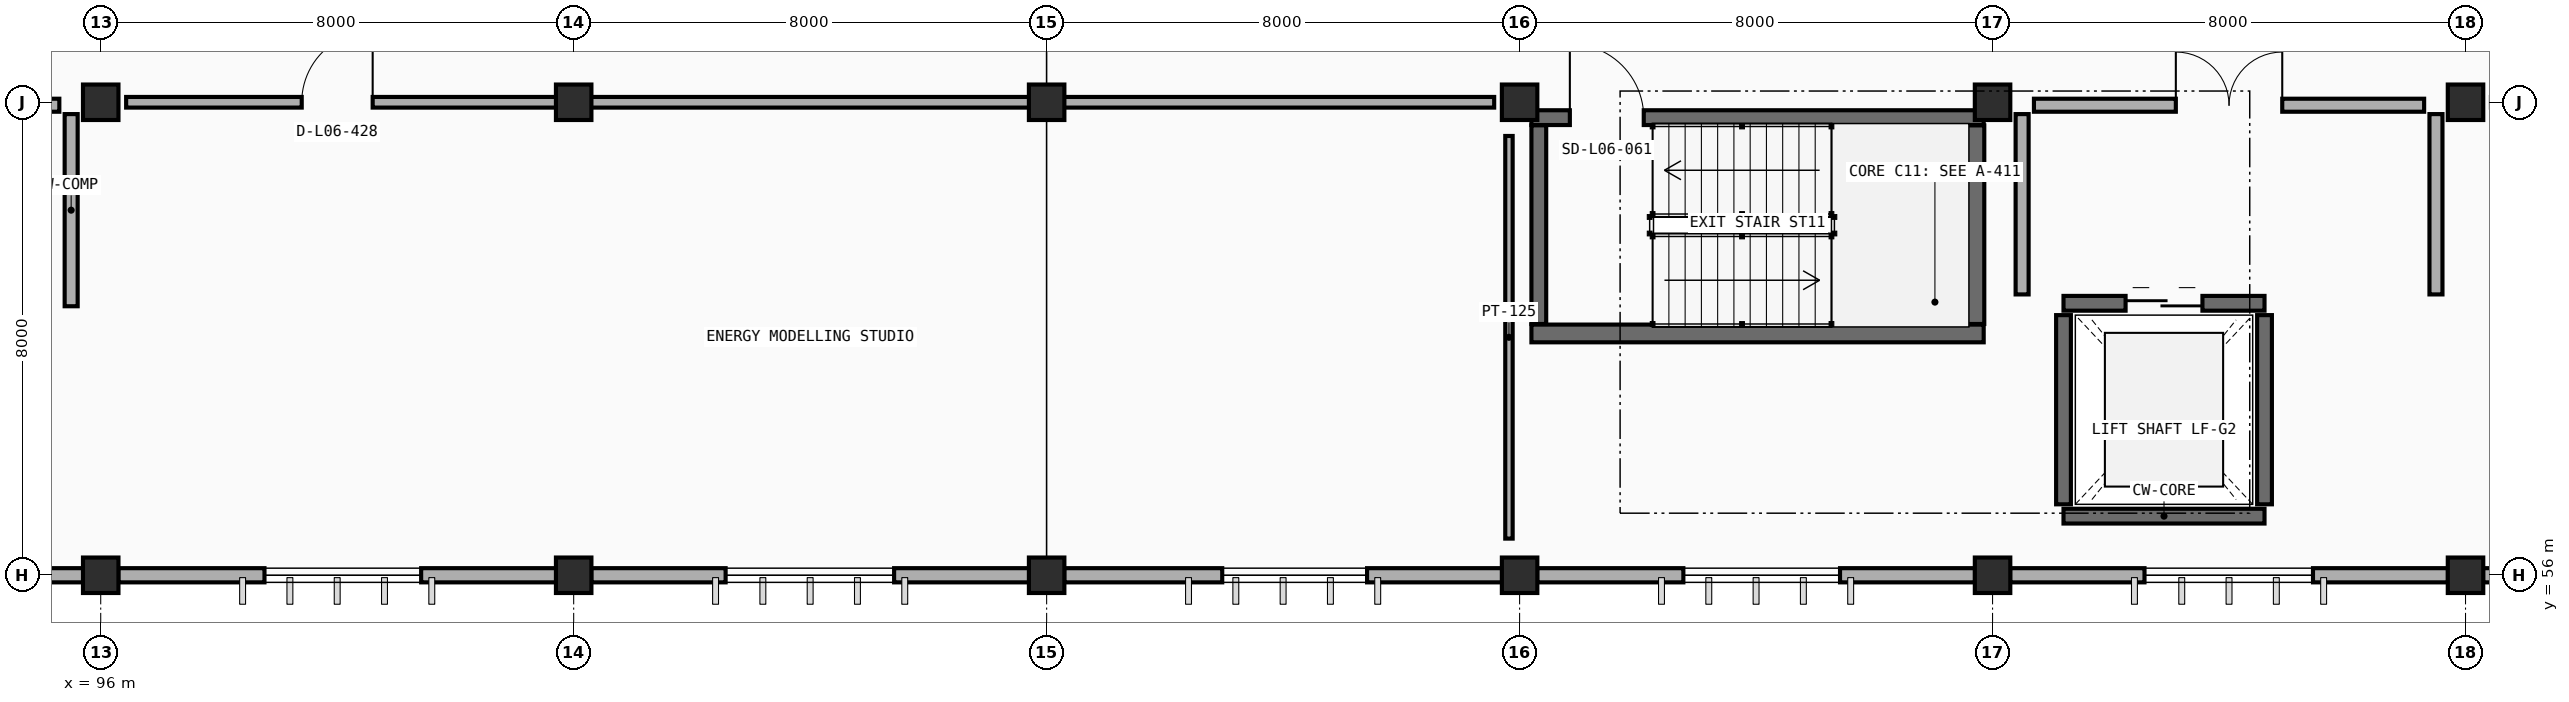
"""IFC4 building model, lengths in metres.
Left out: names, types, materials, properties, quantities, classifications, styles, units other than length and angle.
Written with IfcOpenShell. Run it as: python <this file> out.ifc"""

import sys

from ifc_helpers import new_model, si_unit, direction, frame, frame_2d, origin, origin_2d, place, context, subcontext, project, spatial, rectangle, extrude, element, fill, save


model = new_model("IFC4")
c1 = context("Model", 3, precision=1e-05, world=origin(), true_north=direction((0.0, 1.0)))
c2 = subcontext(c1, "Body", "Model", "MODEL_VIEW")
j1 = project(units=[si_unit("LENGTHUNIT", "METRE"), si_unit("PLANEANGLEUNIT", "RADIAN")], contexts=[c1])
p1 = place(None, origin())
s1 = spatial("IfcSite", under=j1, at=p1, CompositionType="ELEMENT")
p2 = place(p1, origin())
s2 = spatial("IfcBuilding", under=s1, at=p2, CompositionType="ELEMENT")
p3 = place(p2, frame((0.0, 0.0, 22.2)))
s3 = spatial("IfcBuildingStorey", under=s2, at=p3, CompositionType="ELEMENT", Elevation=22.2)
for number, where, z_axis, x_axis in (
    (1, (96.0, 56.0, 0.0), (0.0, 0.0, 1.0), (1.0, 0.0, 0.0)),
    (2, (104.0, 56.0, 0.0), (0.0, 0.0, 1.0), (1.0, 0.0, 0.0)),
    (3, (112.0, 56.0, 0.0), (0.0, 0.0, 1.0), (1.0, 0.0, 0.0)),
    (4, (120.0, 56.0, 0.0), (0.0, 0.0, 1.0), (1.0, 0.0, 0.0)),
    (5, (128.0, 56.0, 0.0), (0.0, 0.0, 1.0), (1.0, 0.0, 0.0)),
    (6, (136.0, 56.0, 0.0), (0.0, 0.0, 1.0), (1.0, 0.0, 0.0)),
    (7, (96.0, 64.0, 0.0), (0.0, 0.0, 1.0), (1.0, 0.0, 0.0)),
    (8, (104.0, 64.0, 0.0), (0.0, 0.0, 1.0), (1.0, 0.0, 0.0)),
    (9, (112.0, 64.0, 0.0), (0.0, 0.0, 1.0), (1.0, 0.0, 0.0)),
    (10, (120.0, 64.0, 0.0), (0.0, 0.0, 1.0), (1.0, 0.0, 0.0)),
    (11, (128.0, 64.0, 0.0), (0.0, 0.0, 1.0), (1.0, 0.0, 0.0)),
    (12, (136.0, 64.0, 0.0), (0.0, 0.0, 1.0), (1.0, 0.0, 0.0)),
):
    element("IfcColumn", number, at=place(p3, frame(where, z_axis=z_axis, x_axis=x_axis)), inside=s3, PredefinedType="COLUMN", context=c2, shape_type="SweptSolid", body=[
        extrude(rectangle(XDim=0.6, YDim=0.6, at=origin_2d()), origin(), (0.0, 0.0, 1.0), 4.2),
    ])
p4 = place(p3, frame((95.703, 56.0, 0.0), z_axis=(0.0, 0.0, 1.0), x_axis=(-1.0, 0.0, 0.0)))
e13 = element("IfcWall", 13, at=p4, inside=s3, PredefinedType="STANDARD", context=c2, shape_type="SweptSolid", body=[
    extrude(rectangle(XDim=7.406, YDim=0.24, at=frame_2d((3.703, 0.0))), origin(), (0.0, 0.0, 1.0), 3.335),
])
p5 = place(p4, frame((2.283, 0.0, 0.9)))
e14 = element("IfcOpeningElement", 14, at=p5, cuts=e13, PredefinedType="OPENING", context=c2, shape_type="SweptSolid", body=[
    extrude(rectangle(XDim=2.45, YDim=2.0, at=frame_2d((1.225, 1.0))), frame((0.0, 0.13, 0.0), z_axis=(0.0, -1.0, 0.0), x_axis=(1.0, 0.0, 0.0)), (0.0, 0.0, 1.0), 0.26),
])
p6 = place(p3, frame((103.703, 56.0, 0.0), z_axis=(0.0, 0.0, 1.0), x_axis=(-1.0, 0.0, 0.0)))
e15 = element("IfcWall", 15, at=p6, inside=s3, PredefinedType="STANDARD", context=c2, shape_type="SweptSolid", body=[
    extrude(rectangle(XDim=7.406, YDim=0.24, at=frame_2d((3.703, 0.0))), origin(), (0.0, 0.0, 1.0), 3.335),
])
p7 = place(p6, frame((2.283, 0.0, 0.9)))
e16 = element("IfcOpeningElement", 16, at=p7, cuts=e15, PredefinedType="OPENING", context=c2, shape_type="SweptSolid", body=[
    extrude(rectangle(XDim=2.65, YDim=2.0, at=frame_2d((1.325, 1.0))), frame((0.0, 0.13, 0.0), z_axis=(0.0, -1.0, 0.0), x_axis=(1.0, 0.0, 0.0)), (0.0, 0.0, 1.0), 0.26),
])
p8 = place(p3, frame((111.703, 56.0, 0.0), z_axis=(0.0, 0.0, 1.0), x_axis=(-1.0, 0.0, 0.0)))
e17 = element("IfcWall", 17, at=p8, inside=s3, PredefinedType="STANDARD", context=c2, shape_type="SweptSolid", body=[
    extrude(rectangle(XDim=7.406, YDim=0.24, at=frame_2d((3.703, 0.0))), origin(), (0.0, 0.0, 1.0), 3.335),
])
p9 = place(p8, frame((2.283, 0.0, 0.9)))
e18 = element("IfcOpeningElement", 18, at=p9, cuts=e17, PredefinedType="OPENING", context=c2, shape_type="SweptSolid", body=[
    extrude(rectangle(XDim=2.85, YDim=2.0, at=frame_2d((1.425, 1.0))), frame((0.0, 0.13, 0.0), z_axis=(0.0, -1.0, 0.0), x_axis=(1.0, 0.0, 0.0)), (0.0, 0.0, 1.0), 0.26),
])
p10 = place(p3, frame((119.703, 56.0, 0.0), z_axis=(0.0, 0.0, 1.0), x_axis=(-1.0, 0.0, 0.0)))
e19 = element("IfcWall", 19, at=p10, inside=s3, PredefinedType="STANDARD", context=c2, shape_type="SweptSolid", body=[
    extrude(rectangle(XDim=7.406, YDim=0.24, at=frame_2d((3.703, 0.0))), origin(), (0.0, 0.0, 1.0), 3.335),
])
p11 = place(p10, frame((2.283, 0.0, 0.9)))
e20 = element("IfcOpeningElement", 20, at=p11, cuts=e19, PredefinedType="OPENING", context=c2, shape_type="SweptSolid", body=[
    extrude(rectangle(XDim=2.45, YDim=2.0, at=frame_2d((1.225, 1.0))), frame((0.0, 0.13, 0.0), z_axis=(0.0, -1.0, 0.0), x_axis=(1.0, 0.0, 0.0)), (0.0, 0.0, 1.0), 0.26),
])
p12 = place(p3, frame((127.703, 56.0, 0.0), z_axis=(0.0, 0.0, 1.0), x_axis=(-1.0, 0.0, 0.0)))
e21 = element("IfcWall", 21, at=p12, inside=s3, PredefinedType="STANDARD", context=c2, shape_type="SweptSolid", body=[
    extrude(rectangle(XDim=7.406, YDim=0.24, at=frame_2d((3.703, 0.0))), origin(), (0.0, 0.0, 1.0), 3.335),
])
p13 = place(p12, frame((2.283, 0.0, 0.9)))
e22 = element("IfcOpeningElement", 22, at=p13, cuts=e21, PredefinedType="OPENING", context=c2, shape_type="SweptSolid", body=[
    extrude(rectangle(XDim=2.65, YDim=2.0, at=frame_2d((1.325, 1.0))), frame((0.0, 0.13, 0.0), z_axis=(0.0, -1.0, 0.0), x_axis=(1.0, 0.0, 0.0)), (0.0, 0.0, 1.0), 0.26),
])
p14 = place(p3, frame((135.703, 56.0, 0.0), z_axis=(0.0, 0.0, 1.0), x_axis=(-1.0, 0.0, 0.0)))
e23 = element("IfcWall", 23, at=p14, inside=s3, PredefinedType="STANDARD", context=c2, shape_type="SweptSolid", body=[
    extrude(rectangle(XDim=7.406, YDim=0.24, at=frame_2d((3.703, 0.0))), origin(), (0.0, 0.0, 1.0), 3.335),
])
p15 = place(p14, frame((2.283, 0.0, 0.9)))
e24 = element("IfcOpeningElement", 24, at=p15, cuts=e23, PredefinedType="OPENING", context=c2, shape_type="SweptSolid", body=[
    extrude(rectangle(XDim=2.85, YDim=2.0, at=frame_2d((1.425, 1.0))), frame((0.0, 0.13, 0.0), z_axis=(0.0, -1.0, 0.0), x_axis=(1.0, 0.0, 0.0)), (0.0, 0.0, 1.0), 0.26),
])
p16 = place(p3, frame((143.703, 56.0, 0.0), z_axis=(0.0, 0.0, 1.0), x_axis=(-1.0, 0.0, 0.0)))
e25 = element("IfcWall", 25, at=p16, inside=s3, PredefinedType="STANDARD", context=c2, shape_type="SweptSolid", body=[
    extrude(rectangle(XDim=7.406, YDim=0.24, at=frame_2d((3.703, 0.0))), origin(), (0.0, 0.0, 1.0), 3.335),
])
p17 = place(p16, frame((2.283, 0.0, 0.9)))
e26 = element("IfcOpeningElement", 26, at=p17, cuts=e25, PredefinedType="OPENING", context=c2, shape_type="SweptSolid", body=[
    extrude(rectangle(XDim=2.45, YDim=2.0, at=frame_2d((1.225, 1.0))), frame((0.0, 0.13, 0.0), z_axis=(0.0, -1.0, 0.0), x_axis=(1.0, 0.0, 0.0)), (0.0, 0.0, 1.0), 0.26),
])
p18 = place(p3, frame((120.2, 60.09, 0.0), z_axis=(0.0, 0.0, 1.0), x_axis=(1.0, 0.0, 0.0)))
e27 = element("IfcWall", 27, at=p18, inside=s3, PredefinedType="SHEAR", context=c2, shape_type="SweptSolid", body=[
    extrude(rectangle(XDim=7.65, YDim=0.3, at=frame_2d((3.825, 0.0))), origin(), (0.0, 0.0, 1.0), 4.2),
])
p19 = place(p3, frame((127.71, 60.25, 0.0), z_axis=(0.0, 0.0, 1.0), x_axis=(0.0, 1.0, 0.0)))
e28 = element("IfcWall", 28, at=p19, inside=s3, PredefinedType="SHEAR", context=c2, shape_type="SweptSolid", body=[
    extrude(rectangle(XDim=3.36, YDim=0.3, at=frame_2d((1.68, 0.0))), origin(), (0.0, 0.0, 1.0), 4.2),
])
p20 = place(p3, frame((120.2, 63.74, 0.0), z_axis=(0.0, 0.0, 1.0), x_axis=(1.0, 0.0, 0.0)))
e29 = element("IfcWall", 29, at=p20, inside=s3, PredefinedType="SOLIDWALL", context=c2, shape_type="SweptSolid", body=[
    extrude(rectangle(XDim=7.65, YDim=0.25, at=frame_2d((3.825, 0.0))), origin(), (0.0, 0.0, 1.0), 4.2),
])
p21 = place(p20, frame((0.65, 0.0, 0.0)))
e30 = element("IfcOpeningElement", 30, at=p21, cuts=e29, PredefinedType="OPENING", context=c2, shape_type="SweptSolid", body=[
    extrude(rectangle(XDim=1.25, YDim=2.15, at=frame_2d((0.625, 1.075))), frame((0.0, 0.135, 0.0), z_axis=(0.0, -1.0, 0.0), x_axis=(1.0, 0.0, 0.0)), (0.0, 0.0, 1.0), 0.27),
])
p22 = place(p3, frame((120.325, 60.25, 0.0), z_axis=(0.0, 0.0, 1.0), x_axis=(0.0, 1.0, 0.0)))
e31 = element("IfcWall", 31, at=p22, inside=s3, PredefinedType="SOLIDWALL", context=c2, shape_type="SweptSolid", body=[
    extrude(rectangle(XDim=3.36, YDim=0.25, at=frame_2d((1.68, 0.0))), origin(), (0.0, 0.0, 1.0), 4.2),
])
p23 = place(p3, frame((88.7, 63.95, 0.0), z_axis=(0.0, 0.0, 1.0), x_axis=(1.0, 0.0, 0.0)))
e32 = element("IfcWall", 32, at=p23, inside=s3, PredefinedType="PARTITIONING", context=c2, shape_type="SweptSolid", body=[
    extrude(rectangle(XDim=6.6, YDim=0.22, at=frame_2d((3.3, 0.0))), origin(), (0.0, 0.0, 1.0), 3.3),
])
p24 = place(p23, frame((2.4, 0.0, 0.0)))
e33 = element("IfcOpeningElement", 33, at=p24, cuts=e32, PredefinedType="OPENING", context=c2, shape_type="SweptSolid", body=[
    extrude(rectangle(XDim=1.8, YDim=2.2, at=frame_2d((0.9, 1.1))), frame((0.0, 0.12, 0.0), z_axis=(0.0, -1.0, 0.0), x_axis=(1.0, 0.0, 0.0)), (0.0, 0.0, 1.0), 0.24),
])
p25 = place(p3, frame((95.5, 60.55, 0.0), z_axis=(0.0, 0.0, 1.0), x_axis=(0.0, 1.0, 0.0)))
e34 = element("IfcWall", 34, at=p25, inside=s3, PredefinedType="PARTITIONING", context=c2, shape_type="SweptSolid", body=[
    extrude(rectangle(XDim=3.25, YDim=0.22, at=frame_2d((1.625, 0.0))), origin(), (0.0, 0.0, 1.0), 3.3),
])
p26 = place(p3, frame((129.2, 57.0, 0.0), z_axis=(0.0, 0.0, 1.0), x_axis=(1.0, 0.0, 0.0)))
e35 = element("IfcWall", 35, at=p26, inside=s3, PredefinedType="SOLIDWALL", context=c2, shape_type="SweptSolid", body=[
    extrude(rectangle(XDim=3.4, YDim=0.25, at=frame_2d((1.7, 0.0))), origin(), (0.0, 0.0, 1.0), 4.2),
])
p27 = place(p3, frame((129.2, 60.6, 0.0), z_axis=(0.0, 0.0, 1.0), x_axis=(1.0, 0.0, 0.0)))
e36 = element("IfcWall", 36, at=p27, inside=s3, PredefinedType="SOLIDWALL", context=c2, shape_type="SweptSolid", body=[
    extrude(rectangle(XDim=3.4, YDim=0.25, at=frame_2d((1.7, 0.0))), origin(), (0.0, 0.0, 1.0), 4.2),
])
p28 = place(p27, frame((1.05, 0.0, 0.0)))
e37 = element("IfcOpeningElement", 37, at=p28, cuts=e36, PredefinedType="OPENING", context=c2, shape_type="SweptSolid", body=[
    extrude(rectangle(XDim=1.3, YDim=2.2, at=frame_2d((0.65, 1.1))), frame((0.0, 0.135, 0.0), z_axis=(0.0, -1.0, 0.0), x_axis=(1.0, 0.0, 0.0)), (0.0, 0.0, 1.0), 0.27),
])
for number, where, z_axis, x_axis in (
    (38, (129.2, 57.2, 0.0), (0.0, 0.0, 1.0), (0.0, 1.0, 0.0)),
    (39, (132.6, 57.2, 0.0), (0.0, 0.0, 1.0), (0.0, 1.0, 0.0)),
):
    element("IfcWall", number, at=place(p3, frame(where, z_axis=z_axis, x_axis=x_axis)), inside=s3, PredefinedType="SOLIDWALL", context=c2, shape_type="SweptSolid", body=[
        extrude(rectangle(XDim=3.2, YDim=0.25, at=frame_2d((1.6, 0.0))), origin(), (0.0, 0.0, 1.0), 4.2),
    ])
p29 = place(p3, frame((128.7, 63.95, 0.0), z_axis=(0.0, 0.0, 1.0), x_axis=(1.0, 0.0, 0.0)))
e40 = element("IfcWall", 40, at=p29, inside=s3, PredefinedType="PARTITIONING", context=c2, shape_type="SweptSolid", body=[
    extrude(rectangle(XDim=6.6, YDim=0.22, at=frame_2d((3.3, 0.0))), origin(), (0.0, 0.0, 1.0), 3.3),
])
p30 = place(p29, frame((2.4, 0.0, 0.0)))
e41 = element("IfcOpeningElement", 41, at=p30, cuts=e40, PredefinedType="OPENING", context=c2, shape_type="SweptSolid", body=[
    extrude(rectangle(XDim=1.8, YDim=2.2, at=frame_2d((0.9, 1.1))), frame((0.0, 0.12, 0.0), z_axis=(0.0, -1.0, 0.0), x_axis=(1.0, 0.0, 0.0)), (0.0, 0.0, 1.0), 0.24),
])
for number, where, z_axis, x_axis in (
    (42, (128.5, 60.75, 0.0), (0.0, 0.0, 1.0), (0.0, 1.0, 0.0)),
    (43, (135.5, 60.75, 0.0), (0.0, 0.0, 1.0), (0.0, 1.0, 0.0)),
):
    element("IfcWall", number, at=place(p3, frame(where, z_axis=z_axis, x_axis=x_axis)), inside=s3, PredefinedType="PARTITIONING", context=c2, shape_type="SweptSolid", body=[
        extrude(rectangle(XDim=3.05, YDim=0.22, at=frame_2d((1.525, 0.0))), origin(), (0.0, 0.0, 1.0), 3.3),
    ])
p31 = place(p3, frame((96.43, 64.0, 0.0), z_axis=(0.0, 0.0, 1.0), x_axis=(1.0, 0.0, 0.0)))
e44 = element("IfcWall", 44, at=p31, inside=s3, PredefinedType="PARTITIONING", context=c2, shape_type="SweptSolid", body=[
    extrude(rectangle(XDim=23.14, YDim=0.18, at=frame_2d((11.57, 0.0))), origin(), (0.0, 0.0, 1.0), 3.3),
])
p32 = place(p31, frame((2.97, 0.0, 0.0)))
e45 = element("IfcOpeningElement", 45, at=p32, cuts=e44, PredefinedType="OPENING", context=c2, shape_type="SweptSolid", body=[
    extrude(rectangle(XDim=1.2, YDim=2.15, at=frame_2d((0.6, 1.075))), frame((0.0, 0.1, 0.0), z_axis=(0.0, -1.0, 0.0), x_axis=(1.0, 0.0, 0.0)), (0.0, 0.0, 1.0), 0.2),
])
p33 = place(p3, frame((119.82, 56.62, 0.0), z_axis=(0.0, 0.0, 1.0), x_axis=(0.0, 1.0, 0.0)))
e46 = element("IfcWall", 46, at=p33, inside=s3, PredefinedType="PARTITIONING", context=c2, shape_type="SweptSolid", body=[
    extrude(rectangle(XDim=6.81, YDim=0.125, at=frame_2d((3.405, 0.0))), origin(), (0.0, 0.0, 1.0), 3.3),
])
p34 = place(p7, origin())
e47 = element("IfcWindow", 47, at=p34, inside=s3, PartitioningType="DOUBLE_PANEL_VERTICAL", PredefinedType="WINDOW", context=c2, shape_type="SweptSolid", body=[
    extrude(rectangle(XDim=2.65, YDim=2.0, at=frame_2d((1.325, 1.0))), frame((0.0, 0.03, 0.0), z_axis=(0.0, -1.0, 0.0), x_axis=(1.0, 0.0, 0.0)), (0.0, 0.0, 1.0), 0.06),
])
fill(e16, e47)
p35 = place(p9, origin())
e48 = element("IfcWindow", 48, at=p35, inside=s3, PartitioningType="DOUBLE_PANEL_VERTICAL", PredefinedType="WINDOW", context=c2, shape_type="SweptSolid", body=[
    extrude(rectangle(XDim=2.85, YDim=2.0, at=frame_2d((1.425, 1.0))), frame((0.0, 0.03, 0.0), z_axis=(0.0, -1.0, 0.0), x_axis=(1.0, 0.0, 0.0)), (0.0, 0.0, 1.0), 0.06),
])
fill(e18, e48)
p36 = place(p11, origin())
e49 = element("IfcWindow", 49, at=p36, inside=s3, PartitioningType="DOUBLE_PANEL_VERTICAL", PredefinedType="WINDOW", context=c2, shape_type="SweptSolid", body=[
    extrude(rectangle(XDim=2.45, YDim=2.0, at=frame_2d((1.225, 1.0))), frame((0.0, 0.03, 0.0), z_axis=(0.0, -1.0, 0.0), x_axis=(1.0, 0.0, 0.0)), (0.0, 0.0, 1.0), 0.06),
])
fill(e20, e49)
p37 = place(p13, origin())
e50 = element("IfcWindow", 50, at=p37, inside=s3, PartitioningType="DOUBLE_PANEL_VERTICAL", PredefinedType="WINDOW", context=c2, shape_type="SweptSolid", body=[
    extrude(rectangle(XDim=2.65, YDim=2.0, at=frame_2d((1.325, 1.0))), frame((0.0, 0.03, 0.0), z_axis=(0.0, -1.0, 0.0), x_axis=(1.0, 0.0, 0.0)), (0.0, 0.0, 1.0), 0.06),
])
fill(e22, e50)
p38 = place(p15, origin())
e51 = element("IfcWindow", 51, at=p38, inside=s3, PartitioningType="DOUBLE_PANEL_VERTICAL", PredefinedType="WINDOW", context=c2, shape_type="SweptSolid", body=[
    extrude(rectangle(XDim=2.85, YDim=2.0, at=frame_2d((1.425, 1.0))), frame((0.0, 0.03, 0.0), z_axis=(0.0, -1.0, 0.0), x_axis=(1.0, 0.0, 0.0)), (0.0, 0.0, 1.0), 0.06),
])
fill(e24, e51)
p39 = place(p21, origin())
e52 = element("IfcDoor", 52, at=p39, inside=s3, OperationType="SINGLE_SWING_LEFT", PredefinedType="DOOR", context=c2, shape_type="SweptSolid", body=[
    extrude(rectangle(XDim=1.25, YDim=2.15, at=frame_2d((0.625, 1.075))), frame((0.0, 0.025, 0.0), z_axis=(0.0, -1.0, 0.0), x_axis=(1.0, 0.0, 0.0)), (0.0, 0.0, 1.0), 0.05),
])
fill(e30, e52)
p40 = place(p28, origin())
e53 = element("IfcDoor", 53, at=p40, inside=s3, OperationType="DOUBLE_DOOR_SLIDING", PredefinedType="DOOR", context=c2, shape_type="SweptSolid", body=[
    extrude(rectangle(XDim=1.3, YDim=2.2, at=frame_2d((0.65, 1.1))), frame((0.0, 0.025, 0.0), z_axis=(0.0, -1.0, 0.0), x_axis=(1.0, 0.0, 0.0)), (0.0, 0.0, 1.0), 0.05),
])
fill(e37, e53)
p41 = place(p30, origin())
e54 = element("IfcDoor", 54, at=p41, inside=s3, OperationType="DOUBLE_DOOR_SINGLE_SWING", PredefinedType="DOOR", context=c2, shape_type="SweptSolid", body=[
    extrude(rectangle(XDim=1.8, YDim=2.2, at=frame_2d((0.9, 1.1))), frame((0.0, 0.025, 0.0), z_axis=(0.0, -1.0, 0.0), x_axis=(1.0, 0.0, 0.0)), (0.0, 0.0, 1.0), 0.05),
])
fill(e41, e54)
p42 = place(p32, origin())
e55 = element("IfcDoor", 55, at=p42, inside=s3, OperationType="SINGLE_SWING_RIGHT", PredefinedType="DOOR", context=c2, shape_type="SweptSolid", body=[
    extrude(rectangle(XDim=1.2, YDim=2.15, at=frame_2d((0.6, 1.075))), frame((0.0, 0.025, 0.0), z_axis=(0.0, -1.0, 0.0), x_axis=(1.0, 0.0, 0.0)), (0.0, 0.0, 1.0), 0.05),
])
fill(e45, e55)
save(model, sys.argv[1])
